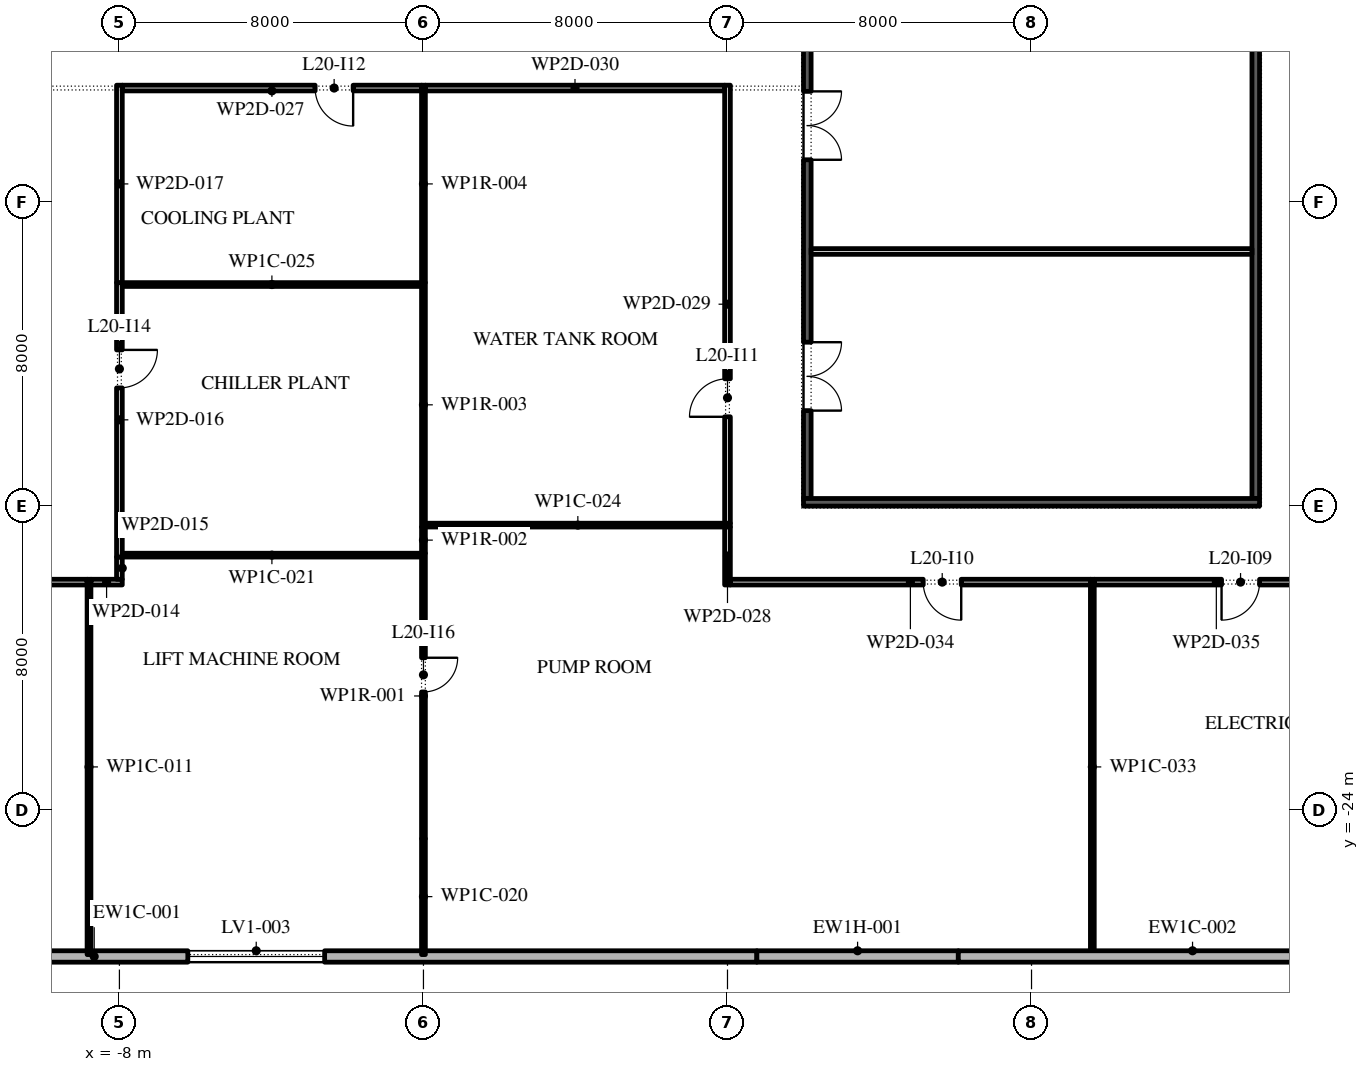
"""IFC4 building model, lengths in metres.
Left out: names, types, materials, properties, quantities, classifications, styles, units other than length and angle.
Written with IfcOpenShell. Run it as: python <this file> out.ifc"""

import sys

from ifc_helpers import new_model, si_unit, direction, frame, frame_2d, origin, place, context, subcontext, project, spatial, rectangle, extrude, element, fill, save


model = new_model("IFC4")
c1 = context("Model", 3, precision=1e-05, world=origin(), true_north=direction((0.0, 1.0)))
c2 = subcontext(c1, "Body", "Model", "MODEL_VIEW")
j1 = project(units=[si_unit("LENGTHUNIT", "METRE"), si_unit("PLANEANGLEUNIT", "RADIAN")], contexts=[c1])
p1 = place(None, origin())
s1 = spatial("IfcSite", under=j1, at=p1, CompositionType="ELEMENT")
p2 = place(p1, origin())
s2 = spatial("IfcBuilding", under=s1, at=p2, CompositionType="ELEMENT")
p3 = place(p2, frame((0.0, 0.0, 94.2)))
s3 = spatial("IfcBuildingStorey", under=s2, at=p3, CompositionType="ELEMENT", Elevation=94.2)
p4 = place(p3, frame((-26.1, -27.85, 0.0), z_axis=(0.0, 0.0, 1.0), x_axis=(1.0, 0.0, 0.0)))
e1 = element("IfcWall", 1, at=p4, inside=s3, PredefinedType="STANDARD", context=c2, shape_type="SweptSolid", body=[
    extrude(rectangle(XDim=34.873, YDim=0.3, at=frame_2d((17.437, 0.0))), origin(), (0.0, 0.0, 1.0), 4.95),
])
p5 = place(p4, frame((11.1, 0.0, 0.6)))
e2 = element("IfcOpeningElement", 2, at=p5, cuts=e1, PredefinedType="OPENING", context=c2, shape_type="SweptSolid", body=[
    extrude(rectangle(XDim=3.6, YDim=3.9, at=frame_2d((1.8, 1.95))), frame((0.0, 0.16, 0.0), z_axis=(0.0, -1.0, 0.0), x_axis=(1.0, 0.0, 0.0)), (0.0, 0.0, 1.0), 0.32),
])
p6 = place(p4, frame((19.9, 0.0, 0.6)))
e3 = element("IfcOpeningElement", 3, at=p6, cuts=e1, PredefinedType="OPENING", context=c2, shape_type="SweptSolid", body=[
    extrude(rectangle(XDim=3.6, YDim=3.9, at=frame_2d((1.8, 1.95))), frame((0.0, 0.16, 0.0), z_axis=(0.0, -1.0, 0.0), x_axis=(1.0, 0.0, 0.0)), (0.0, 0.0, 1.0), 0.32),
])
p7 = place(p3, frame((21.9, -15.8, 0.0), z_axis=(0.0, 0.0, 1.0), x_axis=(0.0, 1.0, 0.0)))
e4 = element("IfcWall", 4, at=p7, inside=s3, PredefinedType="SHEAR", context=c2, shape_type="SweptSolid", body=[
    extrude(rectangle(XDim=13.05, YDim=0.2, at=frame_2d((6.525, 0.0))), origin(), (0.0, 0.0, 1.0), 4.95),
])
p8 = place(p3, frame((10.1, -15.8, 0.0), z_axis=(0.0, 0.0, 1.0), x_axis=(0.0, 1.0, 0.0)))
e5 = element("IfcWall", 5, at=p8, inside=s3, PredefinedType="SHEAR", context=c2, shape_type="SweptSolid", body=[
    extrude(rectangle(XDim=13.05, YDim=0.2, at=frame_2d((6.525, 0.0))), origin(), (0.0, 0.0, 1.0), 4.95),
])
p9 = place(p8, frame((2.312, 0.0, 0.0)))
e6 = element("IfcOpeningElement", 6, at=p9, cuts=e5, PredefinedType="OPENING", context=c2, shape_type="SweptSolid", body=[
    extrude(rectangle(XDim=1.8, YDim=2.4, at=frame_2d((0.9, 1.2))), frame((0.0, 0.11, 0.0), z_axis=(0.0, -1.0, 0.0), x_axis=(1.0, 0.0, 0.0)), (0.0, 0.0, 1.0), 0.22),
])
p10 = place(p8, frame((8.913, 0.0, 0.0)))
e7 = element("IfcOpeningElement", 7, at=p10, cuts=e5, PredefinedType="OPENING", context=c2, shape_type="SweptSolid", body=[
    extrude(rectangle(XDim=1.8, YDim=2.4, at=frame_2d((0.9, 1.2))), frame((0.0, 0.11, 0.0), z_axis=(0.0, -1.0, 0.0), x_axis=(1.0, 0.0, 0.0)), (0.0, 0.0, 1.0), 0.22),
])
p11 = place(p3, frame((10.0, -15.9, 0.0), z_axis=(0.0, 0.0, 1.0), x_axis=(1.0, 0.0, 0.0)))
e8 = element("IfcWall", 8, at=p11, inside=s3, PredefinedType="SHEAR", context=c2, shape_type="SweptSolid", body=[
    extrude(rectangle(XDim=12.0, YDim=0.2, at=frame_2d((6.0, 0.0))), origin(), (0.0, 0.0, 1.0), 4.95),
])
p12 = place(p3, frame((10.2, -9.3, 0.0), z_axis=(0.0, 0.0, 1.0), x_axis=(1.0, 0.0, 0.0)))
e9 = element("IfcWall", 9, at=p12, inside=s3, PredefinedType="PARTITIONING", context=c2, shape_type="SweptSolid", body=[
    extrude(rectangle(XDim=11.6, YDim=0.15, at=frame_2d((5.8, 0.0))), origin(), (0.0, 0.0, 1.0), 4.95),
])
p13 = place(p3, frame((-8.8, -27.8, 0.0), z_axis=(0.0, 0.0, 1.0), x_axis=(0.0, 1.0, 0.0)))
e10 = element("IfcWall", 10, at=p13, inside=s3, PredefinedType="PARTITIONING", context=c2, shape_type="SweptSolid", body=[
    extrude(rectangle(XDim=9.875, YDim=0.1, at=frame_2d((4.938, 0.0))), origin(), (0.0, 0.0, 1.0), 4.95),
])
p14 = place(p3, frame((-8.85, -18.0, 0.0), z_axis=(0.0, 0.0, 1.0), x_axis=(-1.0, 0.0, 0.0)))
e11 = element("IfcWall", 11, at=p14, inside=s3, PredefinedType="PARTITIONING", context=c2, shape_type="SweptSolid", body=[
    extrude(rectangle(XDim=15.075, YDim=0.15, at=frame_2d((7.538, 0.0))), origin(), (0.0, 0.0, 1.0), 4.95),
])
p15 = place(p14, frame((9.7, 0.0, 0.0)))
e12 = element("IfcOpeningElement", 12, at=p15, cuts=e11, PredefinedType="OPENING", context=c2, shape_type="SweptSolid", body=[
    extrude(rectangle(XDim=1.8, YDim=2.1, at=frame_2d((0.9, 1.05))), frame((0.0, 0.085, 0.0), z_axis=(0.0, -1.0, 0.0), x_axis=(1.0, 0.0, 0.0)), (0.0, 0.0, 1.0), 0.17),
])
p16 = place(p3, frame((-7.925, -18.0, 0.0), z_axis=(0.0, 0.0, 1.0), x_axis=(-1.0, 0.0, 0.0)))
e13 = element("IfcWall", 13, at=p16, inside=s3, PredefinedType="PARTITIONING", context=c2, shape_type="SweptSolid", body=[
    extrude(rectangle(XDim=0.825, YDim=0.15, at=frame_2d((0.413, 0.0))), origin(), (0.0, 0.0, 1.0), 4.95),
])
p17 = place(p3, frame((-8.0, -17.34, 0.0), z_axis=(0.0, 0.0, 1.0), x_axis=(0.0, -1.0, 0.0)))
e14 = element("IfcWall", 14, at=p17, inside=s3, PredefinedType="PARTITIONING", context=c2, shape_type="SweptSolid", body=[
    extrude(rectangle(XDim=0.585, YDim=0.15, at=frame_2d((0.292, 0.0))), origin(), (0.0, 0.0, 1.0), 4.95),
])
p18 = place(p3, frame((-8.0, -10.12, 0.0), z_axis=(0.0, 0.0, 1.0), x_axis=(0.0, -1.0, 0.0)))
e15 = element("IfcWall", 15, at=p18, inside=s3, PredefinedType="PARTITIONING", context=c2, shape_type="SweptSolid", body=[
    extrude(rectangle(XDim=7.22, YDim=0.15, at=frame_2d((3.61, 0.0))), origin(), (0.0, 0.0, 1.0), 4.95),
])
p19 = place(p18, frame((1.77, 0.0, 0.0)))
e16 = element("IfcOpeningElement", 16, at=p19, cuts=e15, PredefinedType="OPENING", context=c2, shape_type="SweptSolid", body=[
    extrude(rectangle(XDim=1.0, YDim=2.1, at=frame_2d((0.5, 1.05))), frame((0.0, 0.085, 0.0), z_axis=(0.0, -1.0, 0.0), x_axis=(1.0, 0.0, 0.0)), (0.0, 0.0, 1.0), 0.17),
])
p20 = place(p3, frame((-8.0, -4.925, 0.0), z_axis=(0.0, 0.0, 1.0), x_axis=(0.0, -1.0, 0.0)))
e17 = element("IfcWall", 17, at=p20, inside=s3, PredefinedType="PARTITIONING", context=c2, shape_type="SweptSolid", body=[
    extrude(rectangle(XDim=5.195, YDim=0.15, at=frame_2d((2.598, 0.0))), origin(), (0.0, 0.0, 1.0), 4.95),
])
p21 = place(p3, frame((0.0, -27.8, 0.0), z_axis=(0.0, 0.0, 1.0), x_axis=(0.0, 1.0, 0.0)))
e18 = element("IfcWall", 18, at=p21, inside=s3, PredefinedType="PARTITIONING", context=c2, shape_type="SweptSolid", body=[
    extrude(rectangle(XDim=3.049, YDim=0.1, at=frame_2d((1.524, 0.0))), origin(), (0.0, 0.0, 1.0), 4.95),
])
p22 = place(p3, frame((-0.05, -17.29, 0.0), z_axis=(0.0, 0.0, 1.0), x_axis=(-1.0, 0.0, 0.0)))
e19 = element("IfcWall", 19, at=p22, inside=s3, PredefinedType="PARTITIONING", context=c2, shape_type="SweptSolid", body=[
    extrude(rectangle(XDim=7.875, YDim=0.1, at=frame_2d((3.938, 0.0))), origin(), (0.0, 0.0, 1.0), 4.95),
])
p23 = place(p3, frame((0.0, -17.24, 0.0), z_axis=(0.0, 0.0, 1.0), x_axis=(0.0, 1.0, 0.0)))
e20 = element("IfcWall", 20, at=p23, inside=s3, PredefinedType="PARTITIONING", context=c2, shape_type="SweptSolid", body=[
    extrude(rectangle(XDim=0.69, YDim=0.1, at=frame_2d((0.345, 0.0))), origin(), (0.0, 0.0, 1.0), 3.97),
])
p24 = place(p3, frame((0.0, -16.55, 0.0), z_axis=(0.0, 0.0, 1.0), x_axis=(0.0, 1.0, 0.0)))
e21 = element("IfcWall", 21, at=p24, inside=s3, PredefinedType="PARTITIONING", context=c2, shape_type="SweptSolid", body=[
    extrude(rectangle(XDim=6.43, YDim=0.1, at=frame_2d((3.215, 0.0))), origin(), (0.0, 0.0, 1.0), 3.97),
])
p25 = place(p3, frame((0.05, -16.5, 0.0), z_axis=(0.0, 0.0, 1.0), x_axis=(1.0, 0.0, 0.0)))
e22 = element("IfcWall", 22, at=p25, inside=s3, PredefinedType="PARTITIONING", context=c2, shape_type="SweptSolid", body=[
    extrude(rectangle(XDim=8.025, YDim=0.1, at=frame_2d((4.012, 0.0))), origin(), (0.0, 0.0, 1.0), 4.95),
])
p26 = place(p3, frame((-0.05, -10.17, 0.0), z_axis=(0.0, 0.0, 1.0), x_axis=(-1.0, 0.0, 0.0)))
e23 = element("IfcWall", 23, at=p26, inside=s3, PredefinedType="PARTITIONING", context=c2, shape_type="SweptSolid", body=[
    extrude(rectangle(XDim=7.875, YDim=0.1, at=frame_2d((3.938, 0.0))), origin(), (0.0, 0.0, 1.0), 4.95),
])
p27 = place(p3, frame((0.0, -10.12, 0.0), z_axis=(0.0, 0.0, 1.0), x_axis=(0.0, 1.0, 0.0)))
e24 = element("IfcWall", 24, at=p27, inside=s3, PredefinedType="PARTITIONING", context=c2, shape_type="SweptSolid", body=[
    extrude(rectangle(XDim=5.195, YDim=0.1, at=frame_2d((2.598, 0.0))), origin(), (0.0, 0.0, 1.0), 3.97),
])
p28 = place(p3, frame((-0.05, -5.0, 0.0), z_axis=(0.0, 0.0, 1.0), x_axis=(-1.0, 0.0, 0.0)))
e25 = element("IfcWall", 25, at=p28, inside=s3, PredefinedType="PARTITIONING", context=c2, shape_type="SweptSolid", body=[
    extrude(rectangle(XDim=7.875, YDim=0.15, at=frame_2d((3.938, 0.0))), origin(), (0.0, 0.0, 1.0), 4.95),
])
p29 = place(p28, frame((1.8, 0.0, 0.0)))
e26 = element("IfcOpeningElement", 26, at=p29, cuts=e25, PredefinedType="OPENING", context=c2, shape_type="SweptSolid", body=[
    extrude(rectangle(XDim=1.0, YDim=2.1, at=frame_2d((0.5, 1.05))), frame((0.0, 0.085, 0.0), z_axis=(0.0, -1.0, 0.0), x_axis=(1.0, 0.0, 0.0)), (0.0, 0.0, 1.0), 0.17),
])
p30 = place(p3, frame((8.0, -18.075, 0.0), z_axis=(0.0, 0.0, 1.0), x_axis=(0.0, 1.0, 0.0)))
e27 = element("IfcWall", 27, at=p30, inside=s3, PredefinedType="PARTITIONING", context=c2, shape_type="SweptSolid", body=[
    extrude(rectangle(XDim=1.525, YDim=0.15, at=frame_2d((0.762, 0.0))), origin(), (0.0, 0.0, 1.0), 4.95),
])
p31 = place(p3, frame((8.0, -16.45, 0.0), z_axis=(0.0, 0.0, 1.0), x_axis=(0.0, 1.0, 0.0)))
e28 = element("IfcWall", 28, at=p31, inside=s3, PredefinedType="PARTITIONING", context=c2, shape_type="SweptSolid", body=[
    extrude(rectangle(XDim=11.525, YDim=0.15, at=frame_2d((5.762, 0.0))), origin(), (0.0, 0.0, 1.0), 4.95),
])
p32 = place(p31, frame((2.8, 0.0, 0.0)))
e29 = element("IfcOpeningElement", 29, at=p32, cuts=e28, PredefinedType="OPENING", context=c2, shape_type="SweptSolid", body=[
    extrude(rectangle(XDim=1.0, YDim=2.1, at=frame_2d((0.5, 1.05))), frame((0.0, 0.085, 0.0), z_axis=(0.0, -1.0, 0.0), x_axis=(1.0, 0.0, 0.0)), (0.0, 0.0, 1.0), 0.17),
])
p33 = place(p3, frame((7.925, -5.0, 0.0), z_axis=(0.0, 0.0, 1.0), x_axis=(-1.0, 0.0, 0.0)))
e30 = element("IfcWall", 30, at=p33, inside=s3, PredefinedType="PARTITIONING", context=c2, shape_type="SweptSolid", body=[
    extrude(rectangle(XDim=7.875, YDim=0.15, at=frame_2d((3.938, 0.0))), origin(), (0.0, 0.0, 1.0), 4.95),
])
p34 = place(p3, frame((17.6, -27.8, 0.0), z_axis=(0.0, 0.0, 1.0), x_axis=(0.0, 1.0, 0.0)))
e31 = element("IfcWall", 31, at=p34, inside=s3, PredefinedType="PARTITIONING", context=c2, shape_type="SweptSolid", body=[
    extrude(rectangle(XDim=9.875, YDim=0.1, at=frame_2d((4.938, 0.0))), origin(), (0.0, 0.0, 1.0), 4.95),
])
p35 = place(p3, frame((17.55, -18.0, 0.0), z_axis=(0.0, 0.0, 1.0), x_axis=(-1.0, 0.0, 0.0)))
e32 = element("IfcWall", 32, at=p35, inside=s3, PredefinedType="PARTITIONING", context=c2, shape_type="SweptSolid", body=[
    extrude(rectangle(XDim=9.475, YDim=0.15, at=frame_2d((4.738, 0.0))), origin(), (0.0, 0.0, 1.0), 4.95),
])
p36 = place(p35, frame((3.4, 0.0, 0.0)))
e33 = element("IfcOpeningElement", 33, at=p36, cuts=e32, PredefinedType="OPENING", context=c2, shape_type="SweptSolid", body=[
    extrude(rectangle(XDim=1.0, YDim=2.1, at=frame_2d((0.5, 1.05))), frame((0.0, 0.085, 0.0), z_axis=(0.0, -1.0, 0.0), x_axis=(1.0, 0.0, 0.0)), (0.0, 0.0, 1.0), 0.17),
])
p37 = place(p3, frame((24.075, -18.0, 0.0), z_axis=(0.0, 0.0, 1.0), x_axis=(-1.0, 0.0, 0.0)))
e34 = element("IfcWall", 34, at=p37, inside=s3, PredefinedType="PARTITIONING", context=c2, shape_type="SweptSolid", body=[
    extrude(rectangle(XDim=6.425, YDim=0.15, at=frame_2d((3.212, 0.0))), origin(), (0.0, 0.0, 1.0), 4.95),
])
p38 = place(p37, frame((2.075, 0.0, 0.0)))
e35 = element("IfcOpeningElement", 35, at=p38, cuts=e34, PredefinedType="OPENING", context=c2, shape_type="SweptSolid", body=[
    extrude(rectangle(XDim=1.0, YDim=2.1, at=frame_2d((0.5, 1.05))), frame((0.0, 0.085, 0.0), z_axis=(0.0, -1.0, 0.0), x_axis=(1.0, 0.0, 0.0)), (0.0, 0.0, 1.0), 0.17),
])
p39 = place(p3, frame((8.773, -27.85, 0.0), z_axis=(0.0, 0.0, 1.0), x_axis=(1.0, 0.0, 0.0)))
e36 = element("IfcWall", 36, at=p39, inside=s3, PredefinedType="STANDARD", context=c2, shape_type="SweptSolid", body=[
    extrude(rectangle(XDim=5.3, YDim=0.3, at=frame_2d((2.65, 0.0))), origin(), (0.0, 0.0, 1.0), 4.05),
])
p40 = place(p3, frame((14.073, -27.85, 0.0), z_axis=(0.0, 0.0, 1.0), x_axis=(1.0, 0.0, 0.0)))
e37 = element("IfcWall", 37, at=p40, inside=s3, PredefinedType="STANDARD", context=c2, shape_type="SweptSolid", body=[
    extrude(rectangle(XDim=12.327, YDim=0.3, at=frame_2d((6.163, 0.0))), origin(), (0.0, 0.0, 1.0), 4.95),
])
p41 = place(p3, frame((0.0, -24.751, 0.0), z_axis=(0.0, 0.0, 1.0), x_axis=(0.0, 1.0, 0.0)))
e38 = element("IfcWall", 38, at=p41, inside=s3, PredefinedType="PARTITIONING", context=c2, shape_type="SweptSolid", body=[
    extrude(rectangle(XDim=7.511, YDim=0.1, at=frame_2d((3.755, 0.0))), origin(), (0.0, 0.0, 1.0), 3.97),
])
p42 = place(p41, frame((3.861, 0.0, 0.0)))
e39 = element("IfcOpeningElement", 39, at=p42, cuts=e38, PredefinedType="OPENING", context=c2, shape_type="SweptSolid", body=[
    extrude(rectangle(XDim=0.9, YDim=2.1, at=frame_2d((0.45, 1.05))), frame((0.0, 0.06, 0.0), z_axis=(0.0, -1.0, 0.0), x_axis=(1.0, 0.0, 0.0)), (0.0, 0.0, 1.0), 0.12),
])
p43 = place(p6, origin())
e40 = element("IfcWindow", 40, at=p43, inside=s3, PartitioningType="DOUBLE_PANEL_HORIZONTAL", PredefinedType="WINDOW", context=c2, shape_type="SweptSolid", body=[
    extrude(rectangle(XDim=3.6, YDim=3.9, at=frame_2d((1.8, 1.95))), frame((0.0, 0.03, 0.0), z_axis=(0.0, -1.0, 0.0), x_axis=(1.0, 0.0, 0.0)), (0.0, 0.0, 1.0), 0.06),
])
fill(e3, e40)
p44 = place(p9, frame((1.8, -0.15, 0.0), z_axis=(0.0, 0.0, 1.0), x_axis=(-1.0, 0.0, 0.0)))
e41 = element("IfcDoor", 41, at=p44, inside=s3, OperationType="DOUBLE_DOOR_SINGLE_SWING", PredefinedType="DOOR", context=c2, shape_type="SweptSolid", body=[
    extrude(rectangle(XDim=1.8, YDim=2.4, at=frame_2d((0.9, 1.2))), frame((0.0, -0.05, 0.0), z_axis=(0.0, -1.0, 0.0), x_axis=(1.0, 0.0, 0.0)), (0.0, 0.0, 1.0), 0.05),
])
fill(e6, e41)
p45 = place(p10, frame((1.8, -0.15, 0.0), z_axis=(0.0, 0.0, 1.0), x_axis=(-1.0, 0.0, 0.0)))
e42 = element("IfcDoor", 42, at=p45, inside=s3, OperationType="DOUBLE_DOOR_SINGLE_SWING", PredefinedType="DOOR", context=c2, shape_type="SweptSolid", body=[
    extrude(rectangle(XDim=1.8, YDim=2.4, at=frame_2d((0.9, 1.2))), frame((0.0, -0.05, 0.0), z_axis=(0.0, -1.0, 0.0), x_axis=(1.0, 0.0, 0.0)), (0.0, 0.0, 1.0), 0.05),
])
fill(e7, e42)
p46 = place(p38, origin())
e43 = element("IfcDoor", 43, at=p46, inside=s3, OperationType="SINGLE_SWING_LEFT", PredefinedType="DOOR", context=c2, shape_type="SweptSolid", body=[
    extrude(rectangle(XDim=1.0, YDim=2.1, at=frame_2d((0.5, 1.05))), frame((0.0, 0.025, 0.0), z_axis=(0.0, -1.0, 0.0), x_axis=(1.0, 0.0, 0.0)), (0.0, 0.0, 1.0), 0.05),
])
fill(e35, e43)
p47 = place(p36, origin())
e44 = element("IfcDoor", 44, at=p47, inside=s3, OperationType="SINGLE_SWING_RIGHT", PredefinedType="DOOR", context=c2, shape_type="SweptSolid", body=[
    extrude(rectangle(XDim=1.0, YDim=2.1, at=frame_2d((0.5, 1.05))), frame((0.0, 0.025, 0.0), z_axis=(0.0, -1.0, 0.0), x_axis=(1.0, 0.0, 0.0)), (0.0, 0.0, 1.0), 0.05),
])
fill(e33, e44)
p48 = place(p32, origin())
e45 = element("IfcDoor", 45, at=p48, inside=s3, OperationType="SINGLE_SWING_RIGHT", PredefinedType="DOOR", context=c2, shape_type="SweptSolid", body=[
    extrude(rectangle(XDim=1.0, YDim=2.1, at=frame_2d((0.5, 1.05))), frame((0.0, 0.025, 0.0), z_axis=(0.0, -1.0, 0.0), x_axis=(1.0, 0.0, 0.0)), (0.0, 0.0, 1.0), 0.05),
])
fill(e29, e45)
p49 = place(p29, origin())
e46 = element("IfcDoor", 46, at=p49, inside=s3, OperationType="SINGLE_SWING_RIGHT", PredefinedType="DOOR", context=c2, shape_type="SweptSolid", body=[
    extrude(rectangle(XDim=1.0, YDim=2.1, at=frame_2d((0.5, 1.05))), frame((0.0, 0.025, 0.0), z_axis=(0.0, -1.0, 0.0), x_axis=(1.0, 0.0, 0.0)), (0.0, 0.0, 1.0), 0.05),
])
fill(e26, e46)
p50 = place(p19, origin())
e47 = element("IfcDoor", 47, at=p50, inside=s3, OperationType="SINGLE_SWING_RIGHT", PredefinedType="DOOR", context=c2, shape_type="SweptSolid", body=[
    extrude(rectangle(XDim=1.0, YDim=2.1, at=frame_2d((0.5, 1.05))), frame((0.0, 0.025, 0.0), z_axis=(0.0, -1.0, 0.0), x_axis=(1.0, 0.0, 0.0)), (0.0, 0.0, 1.0), 0.05),
])
fill(e16, e47)
p51 = place(p42, frame((0.9, 0.0, 0.0), z_axis=(0.0, 0.0, 1.0), x_axis=(-1.0, 0.0, 0.0)))
e48 = element("IfcDoor", 48, at=p51, inside=s3, OperationType="SINGLE_SWING_RIGHT", PredefinedType="DOOR", context=c2, shape_type="SweptSolid", body=[
    extrude(rectangle(XDim=0.9, YDim=2.1, at=frame_2d((0.45, 1.05))), frame((0.0, 0.025, 0.0), z_axis=(0.0, -1.0, 0.0), x_axis=(1.0, 0.0, 0.0)), (0.0, 0.0, 1.0), 0.05),
])
fill(e39, e48)
save(model, sys.argv[1])
